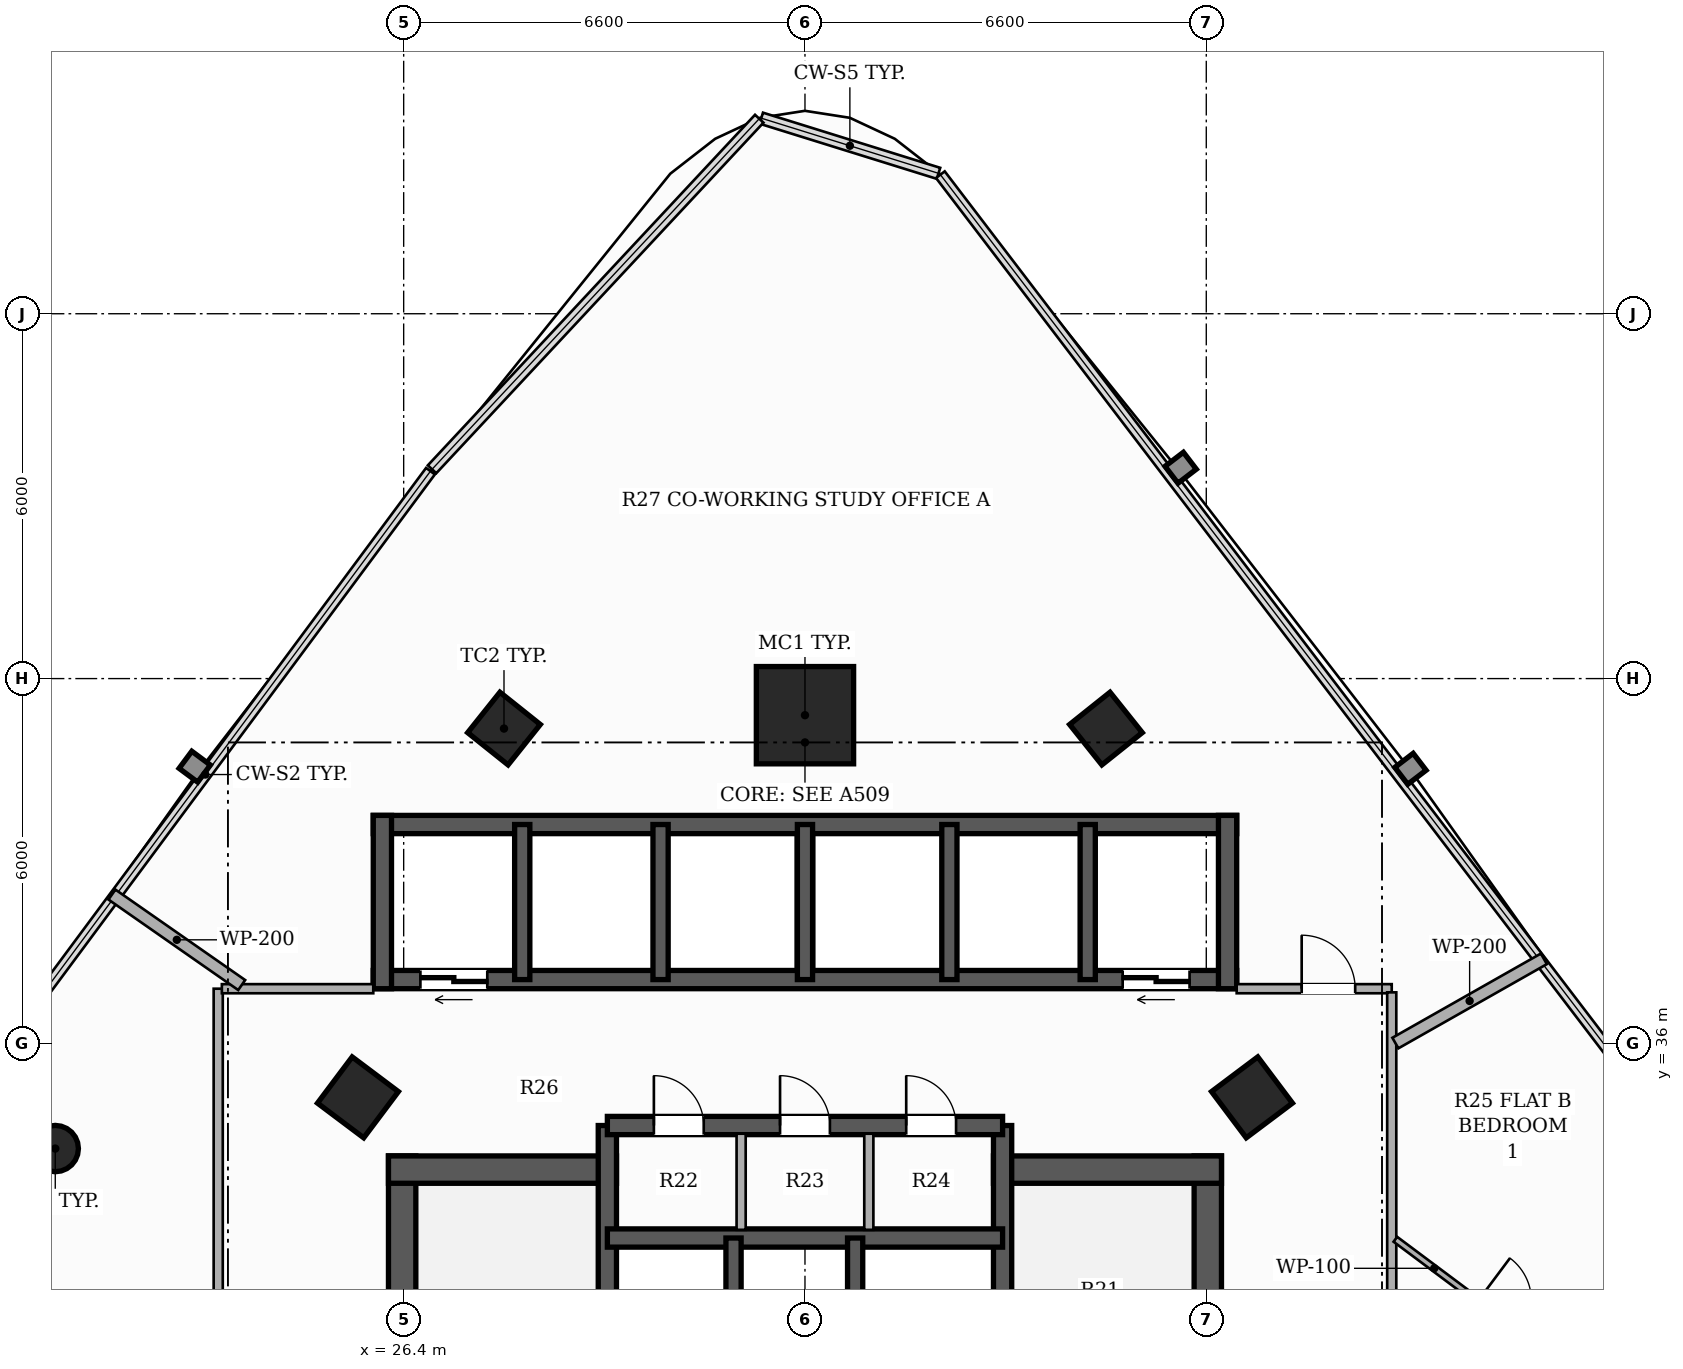
"""IFC4 building model, lengths in metres.
Left out: names, types, materials, properties, quantities, classifications, styles, units other than length and angle.
Written with IfcOpenShell. Run it as: python <this file> out.ifc"""

import sys

from ifc_helpers import new_model, si_unit, direction, frame, frame_2d, origin, origin_2d, place, context, subcontext, project, spatial, rectangle, hollow_rectangle, hollow_circle, extrude, element, fill, save


model = new_model("IFC4")
c1 = context("Model", 3, precision=1e-05, world=origin(), true_north=direction((0.0, 1.0)))
c2 = subcontext(c1, "Body", "Model", "MODEL_VIEW")
j1 = project(units=[si_unit("LENGTHUNIT", "METRE"), si_unit("PLANEANGLEUNIT", "RADIAN")], contexts=[c1])
p1 = place(None, origin())
s1 = spatial("IfcSite", under=j1, at=p1, CompositionType="ELEMENT")
p2 = place(p1, origin())
s2 = spatial("IfcBuilding", under=s1, at=p2, CompositionType="ELEMENT")
p3 = place(p2, frame((0.0, 0.0, 67.55)))
s3 = spatial("IfcBuildingStorey", under=s2, at=p3, CompositionType="ELEMENT", Elevation=67.55)
p4 = place(p3, frame((26.375, 26.45, 0.0), z_axis=(0.0, 0.0, 1.0), x_axis=(0.0, 1.0, 0.0)))
e1 = element("IfcWall", 1, at=p4, inside=s3, PredefinedType="SHEAR", context=c2, shape_type="SweptSolid", body=[
    extrude(rectangle(XDim=7.7, YDim=0.45, at=frame_2d((3.85, 0.0))), origin(), (0.0, 0.0, 1.0), 3.3),
])
p5 = place(p3, frame((26.15, 33.925, 0.0), z_axis=(0.0, 0.0, 1.0), x_axis=(1.0, 0.0, 0.0)))
e2 = element("IfcWall", 2, at=p5, inside=s3, PredefinedType="SHEAR", context=c2, shape_type="SweptSolid", body=[
    extrude(rectangle(XDim=3.75, YDim=0.45, at=frame_2d((1.875, 0.0))), origin(), (0.0, 0.0, 1.0), 3.3),
])
p6 = place(p3, frame((39.625, 26.45, 0.0), z_axis=(0.0, 0.0, 1.0), x_axis=(0.0, 1.0, 0.0)))
e3 = element("IfcWall", 3, at=p6, inside=s3, PredefinedType="SHEAR", context=c2, shape_type="SweptSolid", body=[
    extrude(rectangle(XDim=7.7, YDim=0.45, at=frame_2d((3.85, 0.0))), origin(), (0.0, 0.0, 1.0), 3.3),
])
p7 = place(p3, frame((36.1, 33.925, 0.0), z_axis=(0.0, 0.0, 1.0), x_axis=(1.0, 0.0, 0.0)))
e4 = element("IfcWall", 4, at=p7, inside=s3, PredefinedType="SHEAR", context=c2, shape_type="SweptSolid", body=[
    extrude(rectangle(XDim=3.75, YDim=0.45, at=frame_2d((1.875, 0.0))), origin(), (0.0, 0.0, 1.0), 3.3),
])
p8 = place(p3, frame((29.75, 26.45, 0.0), z_axis=(0.0, 0.0, 1.0), x_axis=(0.0, 1.0, 0.0)))
e5 = element("IfcWall", 5, at=p8, inside=s3, PredefinedType="SHEAR", context=c2, shape_type="SweptSolid", body=[
    extrude(rectangle(XDim=8.2, YDim=0.3, at=frame_2d((4.1, 0.0))), origin(), (0.0, 0.0, 1.0), 3.3),
])
p9 = place(p8, frame((0.6, 0.0, 0.0)))
e6 = element("IfcOpeningElement", 6, at=p9, cuts=e5, PredefinedType="OPENING", context=c2, shape_type="SweptSolid", body=[
    extrude(rectangle(XDim=1.05, YDim=2.15, at=frame_2d((0.525, 1.075))), frame((0.0, 0.16, 0.0), z_axis=(0.0, -1.0, 0.0), x_axis=(1.0, 0.0, 0.0)), (0.0, 0.0, 1.0), 0.32),
])
p10 = place(p3, frame((36.25, 26.45, 0.0), z_axis=(0.0, 0.0, 1.0), x_axis=(0.0, 1.0, 0.0)))
e7 = element("IfcWall", 7, at=p10, inside=s3, PredefinedType="SHEAR", context=c2, shape_type="SweptSolid", body=[
    extrude(rectangle(XDim=8.2, YDim=0.3, at=frame_2d((4.1, 0.0))), origin(), (0.0, 0.0, 1.0), 3.3),
])
p11 = place(p10, frame((0.6, 0.0, 0.0)))
e8 = element("IfcOpeningElement", 8, at=p11, cuts=e7, PredefinedType="OPENING", context=c2, shape_type="SweptSolid", body=[
    extrude(rectangle(XDim=1.05, YDim=2.15, at=frame_2d((0.525, 1.075))), frame((0.0, 0.16, 0.0), z_axis=(0.0, -1.0, 0.0), x_axis=(1.0, 0.0, 0.0)), (0.0, 0.0, 1.0), 0.32),
])
p12 = place(p3, frame((29.75, 32.8, 0.0), z_axis=(0.0, 0.0, 1.0), x_axis=(1.0, 0.0, 0.0)))
e9 = element("IfcWall", 9, at=p12, inside=s3, PredefinedType="SHEAR", context=c2, shape_type="SweptSolid", body=[
    extrude(rectangle(XDim=6.5, YDim=0.3, at=frame_2d((3.25, 0.0))), origin(), (0.0, 0.0, 1.0), 3.3),
])
for number, where, z_axis, x_axis in (
    (10, (31.825, 29.9, 0.0), (0.0, 0.0, 1.0), (0.0, 1.0, 0.0)),
    (11, (33.825, 29.9, 0.0), (0.0, 0.0, 1.0), (0.0, 1.0, 0.0)),
):
    element("IfcWall", number, at=place(p3, frame(where, z_axis=z_axis, x_axis=x_axis)), inside=s3, PredefinedType="SHEAR", context=c2, shape_type="SweptSolid", body=[
        extrude(rectangle(XDim=2.9, YDim=0.25, at=frame_2d((1.45, 0.0))), origin(), (0.0, 0.0, 1.0), 3.3),
    ])
p13 = place(p3, frame((29.75, 34.65, 0.0), z_axis=(0.0, 0.0, 1.0), x_axis=(1.0, 0.0, 0.0)))
e12 = element("IfcWall", 12, at=p13, inside=s3, PredefinedType="SHEAR", context=c2, shape_type="SweptSolid", body=[
    extrude(rectangle(XDim=6.5, YDim=0.3, at=frame_2d((3.25, 0.0))), origin(), (0.0, 0.0, 1.0), 3.3),
])
p14 = place(p13, frame((0.765, 0.0, 0.0)))
e13 = element("IfcOpeningElement", 13, at=p14, cuts=e12, PredefinedType="OPENING", context=c2, shape_type="SweptSolid", body=[
    extrude(rectangle(XDim=0.82, YDim=2.1, at=frame_2d((0.41, 1.05))), frame((0.0, 0.16, 0.0), z_axis=(0.0, -1.0, 0.0), x_axis=(1.0, 0.0, 0.0)), (0.0, 0.0, 1.0), 0.32),
])
p15 = place(p13, frame((2.84, 0.0, 0.0)))
e14 = element("IfcOpeningElement", 14, at=p15, cuts=e12, PredefinedType="OPENING", context=c2, shape_type="SweptSolid", body=[
    extrude(rectangle(XDim=0.82, YDim=2.1, at=frame_2d((0.41, 1.05))), frame((0.0, 0.16, 0.0), z_axis=(0.0, -1.0, 0.0), x_axis=(1.0, 0.0, 0.0)), (0.0, 0.0, 1.0), 0.32),
])
p16 = place(p13, frame((4.915, 0.0, 0.0)))
e15 = element("IfcOpeningElement", 15, at=p16, cuts=e12, PredefinedType="OPENING", context=c2, shape_type="SweptSolid", body=[
    extrude(rectangle(XDim=0.82, YDim=2.1, at=frame_2d((0.41, 1.05))), frame((0.0, 0.16, 0.0), z_axis=(0.0, -1.0, 0.0), x_axis=(1.0, 0.0, 0.0)), (0.0, 0.0, 1.0), 0.32),
])
p17 = place(p3, frame((40.1, 37.05, 0.0), z_axis=(0.0, 0.0, 1.0), x_axis=(-1.0, 0.0, 0.0)))
e16 = element("IfcWall", 16, at=p17, inside=s3, PredefinedType="SHEAR", context=c2, shape_type="SweptSolid", body=[
    extrude(rectangle(XDim=14.2, YDim=0.3, at=frame_2d((7.1, 0.0))), origin(), (0.0, 0.0, 1.0), 3.3),
])
p18 = place(p17, frame((12.325, 0.0, 0.0)))
e17 = element("IfcOpeningElement", 17, at=p18, cuts=e16, PredefinedType="OPENING", context=c2, shape_type="SweptSolid", body=[
    extrude(rectangle(XDim=1.1, YDim=2.2, at=frame_2d((0.55, 1.1))), frame((0.0, 0.16, 0.0), z_axis=(0.0, -1.0, 0.0), x_axis=(1.0, 0.0, 0.0)), (0.0, 0.0, 1.0), 0.32),
])
p19 = place(p17, frame((0.775, 0.0, 0.0)))
e18 = element("IfcOpeningElement", 18, at=p19, cuts=e16, PredefinedType="OPENING", context=c2, shape_type="SweptSolid", body=[
    extrude(rectangle(XDim=1.1, YDim=2.2, at=frame_2d((0.55, 1.1))), frame((0.0, 0.16, 0.0), z_axis=(0.0, -1.0, 0.0), x_axis=(1.0, 0.0, 0.0)), (0.0, 0.0, 1.0), 0.32),
])
p20 = place(p3, frame((25.9, 39.6, 0.0), z_axis=(0.0, 0.0, 1.0), x_axis=(1.0, 0.0, 0.0)))
e19 = element("IfcWall", 19, at=p20, inside=s3, PredefinedType="SHEAR", context=c2, shape_type="SweptSolid", body=[
    extrude(rectangle(XDim=14.2, YDim=0.3, at=frame_2d((7.1, 0.0))), origin(), (0.0, 0.0, 1.0), 3.3),
])
for number, where, z_axis, x_axis in (
    (20, (26.05, 36.9, 0.0), (0.0, 0.0, 1.0), (0.0, 1.0, 0.0)),
    (21, (39.95, 36.9, 0.0), (0.0, 0.0, 1.0), (0.0, 1.0, 0.0)),
):
    element("IfcWall", number, at=place(p3, frame(where, z_axis=z_axis, x_axis=x_axis)), inside=s3, PredefinedType="SHEAR", context=c2, shape_type="SweptSolid", body=[
        extrude(rectangle(XDim=2.85, YDim=0.3, at=frame_2d((1.425, 0.0))), origin(), (0.0, 0.0, 1.0), 3.3),
    ])
for number, where, z_axis, x_axis in (
    (22, (28.35, 37.05, 0.0), (0.0, 0.0, 1.0), (0.0, 1.0, 0.0)),
    (23, (30.625, 37.05, 0.0), (0.0, 0.0, 1.0), (0.0, 1.0, 0.0)),
    (24, (33.0, 37.05, 0.0), (0.0, 0.0, 1.0), (0.0, 1.0, 0.0)),
    (25, (35.375, 37.05, 0.0), (0.0, 0.0, 1.0), (0.0, 1.0, 0.0)),
    (26, (37.65, 37.05, 0.0), (0.0, 0.0, 1.0), (0.0, 1.0, 0.0)),
):
    element("IfcWall", number, at=place(p3, frame(where, z_axis=z_axis, x_axis=x_axis)), inside=s3, PredefinedType="SHEAR", context=c2, shape_type="SweptSolid", body=[
        extrude(rectangle(XDim=2.55, YDim=0.25, at=frame_2d((1.275, 0.0))), origin(), (0.0, 0.0, 1.0), 3.3),
    ])
p21 = place(p3, frame((33.0, 41.398, 0.0), z_axis=(0.0, 0.0, 1.0), x_axis=(1.0, 0.0, 0.0)))
e27 = element("IfcColumn", 27, at=p21, inside=s3, PredefinedType="COLUMN", context=c2, shape_type="SweptSolid", body=[
    extrude(hollow_rectangle(XDim=1.6, YDim=1.6, WallThickness=0.05, at=origin_2d()), origin(), (0.0, 0.0, 1.0), 3.3),
])
for number, where, z_axis, x_axis in (
    (28, (25.648, 35.113, 0.0), (0.0, 0.0, 1.0), (0.6, 0.8, 0.0)),
    (29, (40.352, 35.113, 0.0), (0.0, 0.0, 1.0), (-0.6, 0.8, 0.0)),
):
    element("IfcColumn", number, at=place(p3, frame(where, z_axis=z_axis, x_axis=x_axis)), inside=s3, PredefinedType="COLUMN", context=c2, shape_type="SweptSolid", body=[
        extrude(hollow_rectangle(XDim=0.95, YDim=0.95, WallThickness=0.032, at=origin_2d()), origin(), (0.0, 0.0, 1.0), 3.3),
    ])
for number, where, z_axis, x_axis in (
    (30, (28.05, 41.178, 0.0), (0.0, 0.0, 1.0), (0.624, 0.782, 0.0)),
    (31, (37.95, 41.178, 0.0), (0.0, 0.0, 1.0), (-0.624, 0.782, 0.0)),
):
    element("IfcColumn", number, at=place(p3, frame(where, z_axis=z_axis, x_axis=x_axis)), inside=s3, PredefinedType="COLUMN", context=c2, shape_type="SweptSolid", body=[
        extrude(hollow_rectangle(XDim=0.85, YDim=0.85, WallThickness=0.028, at=origin_2d()), origin(), (0.0, 0.0, 1.0), 3.3),
    ])
p22 = place(p3, frame((20.67, 34.271, 0.0), z_axis=(0.0, 0.0, 1.0), x_axis=(1.0, 0.0, 0.0)))
e32 = element("IfcColumn", 32, at=p22, inside=s3, PredefinedType="COLUMN", context=c2, shape_type="SweptSolid", body=[
    extrude(hollow_circle(Radius=0.381, WallThickness=0.022, at=origin_2d()), origin(), (0.0, 0.0, 1.0), 3.3),
])
for number, where, z_axis, x_axis in (
    (33, (31.95, 32.935, 0.0), (0.0, 0.0, 1.0), (0.0, 1.0, 0.0)),
    (34, (34.05, 32.935, 0.0), (0.0, 0.0, 1.0), (0.0, 1.0, 0.0)),
):
    element("IfcWall", number, at=place(p3, frame(where, z_axis=z_axis, x_axis=x_axis)), inside=s3, PredefinedType="PARTITIONING", context=c2, shape_type="SweptSolid", body=[
        extrude(rectangle(XDim=1.58, YDim=0.15, at=frame_2d((0.79, 0.0))), origin(), (0.0, 0.0, 1.0), 3.06),
    ])
p23 = place(p3, frame((40.1, 36.9, 0.0), z_axis=(0.0, 0.0, 1.0), x_axis=(1.0, 0.0, 0.0)))
e35 = element("IfcWall", 35, at=p23, inside=s3, PredefinedType="PARTITIONING", context=c2, shape_type="SweptSolid", body=[
    extrude(rectangle(XDim=2.55, YDim=0.15, at=frame_2d((1.275, 0.0))), origin(), (0.0, 0.0, 1.0), 2.413),
])
p24 = place(p23, frame((1.069, 0.0, 0.0)))
e36 = element("IfcOpeningElement", 36, at=p24, cuts=e35, PredefinedType="OPENING", context=c2, shape_type="SweptSolid", body=[
    extrude(rectangle(XDim=0.88, YDim=2.1, at=frame_2d((0.44, 1.05))), frame((0.0, 0.085, 0.0), z_axis=(0.0, -1.0, 0.0), x_axis=(1.0, 0.0, 0.0)), (0.0, 0.0, 1.0), 0.17),
])
p25 = place(p3, frame((42.65, 36.84, 0.0), z_axis=(0.0, 0.0, 1.0), x_axis=(0.0, -1.0, 0.0)))
e37 = element("IfcWall", 37, at=p25, inside=s3, PredefinedType="PARTITIONING", context=c2, shape_type="SweptSolid", body=[
    extrude(rectangle(XDim=25.04, YDim=0.15, at=frame_2d((12.52, 0.0))), origin(), (0.0, 0.0, 1.0), 2.413),
])
p26 = place(p25, frame((6.577, 0.0, 0.0)))
e38 = element("IfcOpeningElement", 38, at=p26, cuts=e37, PredefinedType="OPENING", context=c2, shape_type="SweptSolid", body=[
    extrude(rectangle(XDim=0.92, YDim=2.15, at=frame_2d((0.46, 1.075))), frame((0.0, 0.085, 0.0), z_axis=(0.0, -1.0, 0.0), x_axis=(1.0, 0.0, 0.0)), (0.0, 0.0, 1.0), 0.17),
])
p27 = place(p25, frame((19.777, 0.0, 0.0)))
e39 = element("IfcOpeningElement", 39, at=p27, cuts=e37, PredefinedType="OPENING", context=c2, shape_type="SweptSolid", body=[
    extrude(rectangle(XDim=0.88, YDim=2.1, at=frame_2d((0.44, 1.05))), frame((0.0, 0.085, 0.0), z_axis=(0.0, -1.0, 0.0), x_axis=(1.0, 0.0, 0.0)), (0.0, 0.0, 1.0), 0.17),
])
p28 = place(p25, frame((14.193, 0.0, 0.0)))
e40 = element("IfcOpeningElement", 40, at=p28, cuts=e37, PredefinedType="OPENING", context=c2, shape_type="SweptSolid", body=[
    extrude(rectangle(XDim=0.88, YDim=2.1, at=frame_2d((0.44, 1.05))), frame((0.0, 0.085, 0.0), z_axis=(0.0, -1.0, 0.0), x_axis=(1.0, 0.0, 0.0)), (0.0, 0.0, 1.0), 0.17),
])
p29 = place(p3, frame((23.35, 11.86, 0.0), z_axis=(0.0, 0.0, 1.0), x_axis=(0.0, 1.0, 0.0)))
e41 = element("IfcWall", 41, at=p29, inside=s3, PredefinedType="PARTITIONING", context=c2, shape_type="SweptSolid", body=[
    extrude(rectangle(XDim=25.04, YDim=0.15, at=frame_2d((12.52, 0.0))), origin(), (0.0, 0.0, 1.0), 2.413),
])
p30 = place(p29, frame((18.154, 0.0, 0.0)))
e42 = element("IfcOpeningElement", 42, at=p30, cuts=e41, PredefinedType="OPENING", context=c2, shape_type="SweptSolid", body=[
    extrude(rectangle(XDim=0.88, YDim=2.1, at=frame_2d((0.44, 1.05))), frame((0.0, 0.085, 0.0), z_axis=(0.0, -1.0, 0.0), x_axis=(1.0, 0.0, 0.0)), (0.0, 0.0, 1.0), 0.17),
])
p31 = place(p29, frame((10.346, 0.0, 0.0)))
e43 = element("IfcOpeningElement", 43, at=p31, cuts=e41, PredefinedType="OPENING", context=c2, shape_type="SweptSolid", body=[
    extrude(rectangle(XDim=0.88, YDim=2.1, at=frame_2d((0.44, 1.05))), frame((0.0, 0.085, 0.0), z_axis=(0.0, -1.0, 0.0), x_axis=(1.0, 0.0, 0.0)), (0.0, 0.0, 1.0), 0.17),
])
p32 = place(p29, frame((6.32, 0.0, 0.0)))
e44 = element("IfcOpeningElement", 44, at=p32, cuts=e41, PredefinedType="OPENING", context=c2, shape_type="SweptSolid", body=[
    extrude(rectangle(XDim=0.88, YDim=2.1, at=frame_2d((0.44, 1.05))), frame((0.0, 0.085, 0.0), z_axis=(0.0, -1.0, 0.0), x_axis=(1.0, 0.0, 0.0)), (0.0, 0.0, 1.0), 0.17),
])
p33 = place(p29, frame((1.719, 0.0, 0.0)))
e45 = element("IfcOpeningElement", 45, at=p33, cuts=e41, PredefinedType="OPENING", context=c2, shape_type="SweptSolid", body=[
    extrude(rectangle(XDim=0.88, YDim=2.1, at=frame_2d((0.44, 1.05))), frame((0.0, 0.085, 0.0), z_axis=(0.0, -1.0, 0.0), x_axis=(1.0, 0.0, 0.0)), (0.0, 0.0, 1.0), 0.17),
])
p34 = place(p3, frame((23.41, 36.9, 0.0), z_axis=(0.0, 0.0, 1.0), x_axis=(1.0, 0.0, 0.0)))
e46 = element("IfcWall", 46, at=p34, inside=s3, PredefinedType="PARTITIONING", context=c2, shape_type="SweptSolid", body=[
    extrude(rectangle(XDim=2.49, YDim=0.15, at=frame_2d((1.245, 0.0))), origin(), (0.0, 0.0, 1.0), 2.413),
])
p35 = place(p3, frame((45.152, 37.391, 0.0), z_axis=(0.0, 0.0, 1.0), x_axis=(-0.86984931175, -0.4933175193, 0.0)))
e47 = element("IfcWall", 47, at=p35, inside=s3, PredefinedType="PARTITIONING", context=c2, shape_type="SweptSolid", body=[
    extrude(rectangle(XDim=2.808, YDim=0.2, at=frame_2d((1.404, 0.0))), origin(), (0.0, 0.0, 1.0), 2.619),
])
p36 = place(p3, frame((23.736, 36.96, 0.0), z_axis=(0.0, 0.0, 1.0), x_axis=(-0.820275422115, 0.571968733302, 0.0)))
e48 = element("IfcWall", 48, at=p36, inside=s3, PredefinedType="PARTITIONING", context=c2, shape_type="SweptSolid", body=[
    extrude(rectangle(XDim=2.602, YDim=0.2, at=frame_2d((1.301, 0.0))), origin(), (0.0, 0.0, 1.0), 3.06),
])
p37 = place(p3, frame((42.71, 32.779, 0.0), z_axis=(0.0, 0.0, 1.0), x_axis=(0.801226493917, -0.598361183104, 0.0)))
e49 = element("IfcWall", 49, at=p37, inside=s3, PredefinedType="PARTITIONING", context=c2, shape_type="SweptSolid", body=[
    extrude(rectangle(XDim=4.27, YDim=0.1, at=frame_2d((2.135, 0.0))), origin(), (0.0, 0.0, 1.0), 3.06),
])
p38 = place(p37, frame((1.695, 0.0, 0.0)))
e50 = element("IfcOpeningElement", 50, at=p38, cuts=e49, PredefinedType="OPENING", context=c2, shape_type="SweptSolid", body=[
    extrude(rectangle(XDim=0.88, YDim=2.1, at=frame_2d((0.44, 1.05))), frame((0.0, 0.06, 0.0), z_axis=(0.0, -1.0, 0.0), x_axis=(1.0, 0.0, 0.0)), (0.0, 0.0, 1.0), 0.12),
])
p39 = place(p3, frame((46.131, 30.224, 0.0), z_axis=(0.0, 0.0, 1.0), x_axis=(0.598226648312, 0.801326947787, 0.0)))
e51 = element("IfcWall", 51, at=p39, inside=s3, PredefinedType="PARTITIONING", context=c2, shape_type="SweptSolid", body=[
    extrude(rectangle(XDim=3.373, YDim=0.12, at=frame_2d((1.687, 0.0))), origin(), (0.0, 0.0, 1.0), 3.06),
])
p40 = place(p18, origin())
e52 = element("IfcDoor", 52, at=p40, inside=s3, OperationType="DOUBLE_DOOR_SLIDING", PredefinedType="DOOR", context=c2, shape_type="SweptSolid", body=[
    extrude(rectangle(XDim=1.1, YDim=2.2, at=frame_2d((0.55, 1.1))), frame((0.0, 0.025, 0.0), z_axis=(0.0, -1.0, 0.0), x_axis=(1.0, 0.0, 0.0)), (0.0, 0.0, 1.0), 0.05),
])
fill(e17, e52)
p41 = place(p19, origin())
e53 = element("IfcDoor", 53, at=p41, inside=s3, OperationType="DOUBLE_DOOR_SLIDING", PredefinedType="DOOR", context=c2, shape_type="SweptSolid", body=[
    extrude(rectangle(XDim=1.1, YDim=2.2, at=frame_2d((0.55, 1.1))), frame((0.0, 0.025, 0.0), z_axis=(0.0, -1.0, 0.0), x_axis=(1.0, 0.0, 0.0)), (0.0, 0.0, 1.0), 0.05),
])
fill(e18, e53)
p42 = place(p14, origin())
e54 = element("IfcDoor", 54, at=p42, inside=s3, OperationType="SINGLE_SWING_LEFT", PredefinedType="DOOR", context=c2, shape_type="SweptSolid", body=[
    extrude(rectangle(XDim=0.82, YDim=2.1, at=frame_2d((0.41, 1.05))), frame((0.0, 0.025, 0.0), z_axis=(0.0, -1.0, 0.0), x_axis=(1.0, 0.0, 0.0)), (0.0, 0.0, 1.0), 0.05),
])
fill(e13, e54)
p43 = place(p15, origin())
e55 = element("IfcDoor", 55, at=p43, inside=s3, OperationType="SINGLE_SWING_LEFT", PredefinedType="DOOR", context=c2, shape_type="SweptSolid", body=[
    extrude(rectangle(XDim=0.82, YDim=2.1, at=frame_2d((0.41, 1.05))), frame((0.0, 0.025, 0.0), z_axis=(0.0, -1.0, 0.0), x_axis=(1.0, 0.0, 0.0)), (0.0, 0.0, 1.0), 0.05),
])
fill(e14, e55)
p44 = place(p16, origin())
e56 = element("IfcDoor", 56, at=p44, inside=s3, OperationType="SINGLE_SWING_LEFT", PredefinedType="DOOR", context=c2, shape_type="SweptSolid", body=[
    extrude(rectangle(XDim=0.82, YDim=2.1, at=frame_2d((0.41, 1.05))), frame((0.0, 0.025, 0.0), z_axis=(0.0, -1.0, 0.0), x_axis=(1.0, 0.0, 0.0)), (0.0, 0.0, 1.0), 0.05),
])
fill(e15, e56)
p45 = place(p24, origin())
e57 = element("IfcDoor", 57, at=p45, inside=s3, OperationType="SINGLE_SWING_LEFT", PredefinedType="DOOR", context=c2, shape_type="SweptSolid", body=[
    extrude(rectangle(XDim=0.88, YDim=2.1, at=frame_2d((0.44, 1.05))), frame((0.0, 0.025, 0.0), z_axis=(0.0, -1.0, 0.0), x_axis=(1.0, 0.0, 0.0)), (0.0, 0.0, 1.0), 0.05),
])
fill(e36, e57)
save(model, sys.argv[1])
